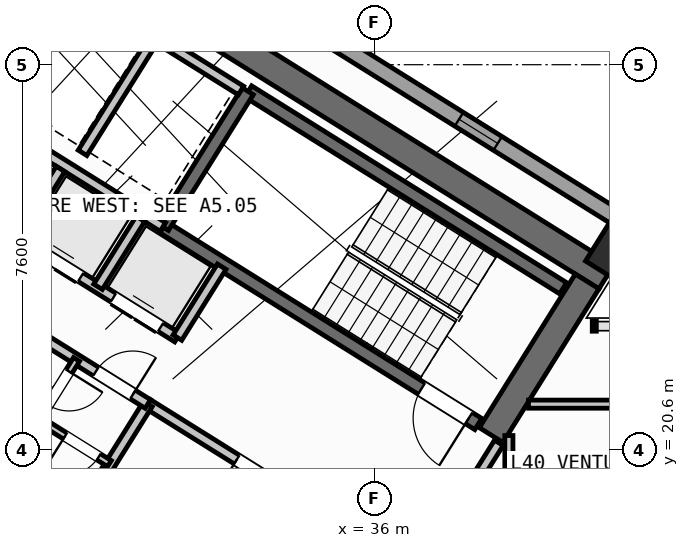
"""IFC4 building model, lengths in metres.
Left out: names, types, materials, properties, quantities, classifications, styles, units other than length and angle.
Written with IfcOpenShell. Run it as: python <this file> out.ifc"""

import sys

from ifc_helpers import new_model, si_unit, direction, frame, frame_2d, origin, origin_2d, place, context, subcontext, project, spatial, rectangle, hollow_rectangle, extrude, source, transform, mapped, element, fill, save


model = new_model("IFC4")
c1 = context("Model", 3, precision=1e-05, world=origin(), true_north=direction((0.0, 1.0)))
c2 = subcontext(c1, "Body", "Model", "MODEL_VIEW")
j1 = project(units=[si_unit("LENGTHUNIT", "METRE"), si_unit("PLANEANGLEUNIT", "RADIAN")], contexts=[c1])
p1 = place(None, origin())
s1 = spatial("IfcSite", under=j1, at=p1, CompositionType="ELEMENT")
p2 = place(p1, origin())
s2 = spatial("IfcBuilding", under=s1, at=p2, CompositionType="ELEMENT")
p3 = place(p2, frame((0.0, 0.0, 158.7)))
s3 = spatial("IfcBuildingStorey", under=s2, at=p3, CompositionType="ELEMENT", Elevation=158.7)
p4 = place(p3, frame((40.573, 24.01, 0.0), z_axis=(0.0, 0.0, 1.0), x_axis=(-0.848047359947, 0.529920442413, 0.0)))
e1 = element("IfcWall", 1, at=p4, inside=s3, PredefinedType="SHEAR", context=c2, shape_type="SweptSolid", body=[
    extrude(rectangle(XDim=13.14, YDim=0.55, at=frame_2d((6.57, 0.0))), origin(), (0.0, 0.0, 1.0), 3.35),
])
p5 = place(p3, frame((40.194, 23.922, 0.0), z_axis=(0.0, 0.0, 1.0), x_axis=(-0.529888438328, -0.848067357541, 0.0)))
e2 = element("IfcWall", 2, at=p5, inside=s3, PredefinedType="SHEAR", context=c2, shape_type="SweptSolid", body=[
    extrude(rectangle(XDim=3.575, YDim=0.55, at=frame_2d((1.788, 0.0))), origin(), (0.0, 0.0, 1.0), 3.35),
])
p6 = place(p3, frame((29.517, 30.594, 0.0), z_axis=(0.0, 0.0, 1.0), x_axis=(-0.529906864564, -0.848055844204, 0.0)))
e3 = element("IfcWall", 3, at=p6, inside=s3, PredefinedType="SHEAR", context=c2, shape_type="SweptSolid", body=[
    extrude(rectangle(XDim=3.575, YDim=0.55, at=frame_2d((1.788, 0.0))), origin(), (0.0, 0.0, 1.0), 3.35),
])
m1 = source(origin(), c2, "Body", "SweptSolid", [
    extrude(hollow_rectangle(XDim=0.9, YDim=0.9, WallThickness=0.036, at=origin_2d()), origin(), (0.0, 0.0, 1.0), 3.6),
])
p7 = place(p3, frame((40.783, 24.469, 0.0), z_axis=(0.0, 0.0, 1.0), x_axis=(-0.848048096156, 0.529919264233, 0.0)))
e4 = element("IfcColumn", 4, at=p7, inside=s3, PredefinedType="COLUMN", context=c2, shape_type="MappedRepresentation", body=[
    mapped(m1, transform((0.0, 0.0, 0.0), scale=1.0)),
])
p8 = place(p3, frame((14.138, 41.825, 0.0), z_axis=(0.0, 0.0, 1.0), x_axis=(0.848046498049, -0.529921821731, 0.0)))
e5 = element("IfcWall", 5, at=p8, inside=s3, PredefinedType="STANDARD", context=c2, shape_type="SweptSolid", body=[
    extrude(rectangle(XDim=31.588, YDim=0.32, at=frame_2d((15.794, 0.0))), origin(), (0.0, 0.0, 1.0), 3.35),
])
p9 = place(p8, frame((9.792, 0.0, 0.0)))
e6 = element("IfcOpeningElement", 6, at=p9, cuts=e5, PredefinedType="OPENING", context=c2, shape_type="SweptSolid", body=[
    extrude(rectangle(XDim=1.05, YDim=2.15, at=frame_2d((0.525, 1.075))), frame((0.0, 0.17, 0.0), z_axis=(0.0, -1.0, 0.0), x_axis=(1.0, 0.0, 0.0)), (0.0, 0.0, 1.0), 0.34),
])
p10 = place(p8, frame((0.791, 0.0, 0.85)))
e7 = element("IfcOpeningElement", 7, at=p10, cuts=e5, PredefinedType="OPENING", context=c2, shape_type="SweptSolid", body=[
    extrude(rectangle(XDim=1.8, YDim=1.5, at=frame_2d((0.9, 0.75))), frame((0.0, 0.17, 0.0), z_axis=(0.0, -1.0, 0.0), x_axis=(1.0, 0.0, 0.0)), (0.0, 0.0, 1.0), 0.34),
])
p11 = place(p8, frame((3.996, 0.0, 0.95)))
e8 = element("IfcOpeningElement", 8, at=p11, cuts=e5, PredefinedType="OPENING", context=c2, shape_type="SweptSolid", body=[
    extrude(rectangle(XDim=1.2, YDim=1.4, at=frame_2d((0.6, 0.7))), frame((0.0, 0.17, 0.0), z_axis=(0.0, -1.0, 0.0), x_axis=(1.0, 0.0, 0.0)), (0.0, 0.0, 1.0), 0.34),
])
p12 = place(p8, frame((13.874, 0.0, 0.85)))
e9 = element("IfcOpeningElement", 9, at=p12, cuts=e5, PredefinedType="OPENING", context=c2, shape_type="SweptSolid", body=[
    extrude(rectangle(XDim=1.5, YDim=1.5, at=frame_2d((0.75, 0.75))), frame((0.0, 0.17, 0.0), z_axis=(0.0, -1.0, 0.0), x_axis=(1.0, 0.0, 0.0)), (0.0, 0.0, 1.0), 0.34),
])
p13 = place(p8, frame((17.104, 0.0, 1.0)))
e10 = element("IfcOpeningElement", 10, at=p13, cuts=e5, PredefinedType="OPENING", context=c2, shape_type="SweptSolid", body=[
    extrude(rectangle(XDim=0.9, YDim=1.25, at=frame_2d((0.45, 0.625))), frame((0.0, 0.17, 0.0), z_axis=(0.0, -1.0, 0.0), x_axis=(1.0, 0.0, 0.0)), (0.0, 0.0, 1.0), 0.34),
])
p14 = place(p8, frame((22.144, 0.0, 1.0)))
e11 = element("IfcOpeningElement", 11, at=p14, cuts=e5, PredefinedType="OPENING", context=c2, shape_type="SweptSolid", body=[
    extrude(rectangle(XDim=0.9, YDim=1.25, at=frame_2d((0.45, 0.625))), frame((0.0, 0.17, 0.0), z_axis=(0.0, -1.0, 0.0), x_axis=(1.0, 0.0, 0.0)), (0.0, 0.0, 1.0), 0.34),
])
p15 = place(p8, frame((27.744, 0.0, 1.0)))
e12 = element("IfcOpeningElement", 12, at=p15, cuts=e5, PredefinedType="OPENING", context=c2, shape_type="SweptSolid", body=[
    extrude(rectangle(XDim=0.9, YDim=1.25, at=frame_2d((0.45, 0.625))), frame((0.0, 0.17, 0.0), z_axis=(0.0, -1.0, 0.0), x_axis=(1.0, 0.0, 0.0)), (0.0, 0.0, 1.0), 0.34),
])
p16 = place(p3, frame((31.28, 18.261, 0.0), z_axis=(0.0, 0.0, 1.0), x_axis=(-0.848051618787, 0.529913626805, 0.0)))
e13 = element("IfcWall", 13, at=p16, inside=s3, PredefinedType="SHEAR", context=c2, shape_type="SweptSolid", body=[
    extrude(rectangle(XDim=7.46, YDim=0.26, at=frame_2d((3.73, 0.0))), origin(), (0.0, 0.0, 1.0), 3.35),
])
p17 = place(p16, frame((0.36, 0.0, 0.0)))
e14 = element("IfcOpeningElement", 14, at=p17, cuts=e13, PredefinedType="OPENING", context=c2, shape_type="SweptSolid", body=[
    extrude(rectangle(XDim=0.86, YDim=2.05, at=frame_2d((0.43, 1.025))), frame((0.0, 0.14, 0.0), z_axis=(0.0, -1.0, 0.0), x_axis=(1.0, 0.0, 0.0)), (0.0, 0.0, 1.0), 0.28),
])
p18 = place(p3, frame((39.721, 23.788, 0.0), z_axis=(0.0, 0.0, 1.0), x_axis=(-0.848054434086, 0.529909121291, 0.0)))
e15 = element("IfcWall", 15, at=p18, inside=s3, PredefinedType="SHEAR", context=c2, shape_type="SweptSolid", body=[
    extrude(rectangle(XDim=7.33, YDim=0.26, at=frame_2d((3.665, 0.0))), origin(), (0.0, 0.0, 1.0), 3.35),
])
p19 = place(p3, frame((38.046, 21.108, 0.0), z_axis=(0.0, 0.0, 1.0), x_axis=(-0.848054434086, 0.529909121291, 0.0)))
e16 = element("IfcWall", 16, at=p19, inside=s3, PredefinedType="SHEAR", context=c2, shape_type="SweptSolid", body=[
    extrude(rectangle(XDim=7.33, YDim=0.26, at=frame_2d((3.665, 0.0))), origin(), (0.0, 0.0, 1.0), 3.35),
])
p20 = place(p19, frame((0.22, 0.0, 0.0)))
e17 = element("IfcOpeningElement", 17, at=p20, cuts=e16, PredefinedType="OPENING", context=c2, shape_type="SweptSolid", body=[
    extrude(rectangle(XDim=1.1, YDim=2.1, at=frame_2d((0.55, 1.05))), frame((0.0, 0.14, 0.0), z_axis=(0.0, -1.0, 0.0), x_axis=(1.0, 0.0, 0.0)), (0.0, 0.0, 1.0), 0.28),
])
p21 = place(p3, frame((33.496, 27.677, 0.0), z_axis=(0.0, 0.0, 1.0), x_axis=(-0.529908658664, -0.84805472316, 0.0)))
e18 = element("IfcWall", 18, at=p21, inside=s3, PredefinedType="SHEAR", context=c2, shape_type="SweptSolid", body=[
    extrude(rectangle(XDim=3.16, YDim=0.26, at=frame_2d((1.58, 0.0))), origin(), (0.0, 0.0, 1.0), 3.35),
])
p22 = place(p3, frame((36.417, 18.447, 0.0), z_axis=(0.0, 0.0, 1.0), x_axis=(-0.848064879198, 0.529892404805, 0.0)))
e19 = element("IfcWall", 19, at=p22, inside=s3, PredefinedType="STANDARD", context=c2, shape_type="SweptSolid", body=[
    extrude(rectangle(XDim=5.768, YDim=0.2, at=frame_2d((2.884, 0.0))), origin(), (0.0, 0.0, 1.0), 3.34),
])
p23 = place(p22, frame((2.548, 0.0, 0.0)))
e20 = element("IfcOpeningElement", 20, at=p23, cuts=e19, PredefinedType="OPENING", context=c2, shape_type="SweptSolid", body=[
    extrude(rectangle(XDim=1.15, YDim=2.1, at=frame_2d((0.575, 1.05))), frame((0.0, 0.11, 0.0), z_axis=(0.0, -1.0, 0.0), x_axis=(1.0, 0.0, 0.0)), (0.0, 0.0, 1.0), 0.22),
])
p24 = place(p3, frame((31.822, 24.998, 0.0), z_axis=(0.0, 0.0, 1.0), x_axis=(-0.848036912365, 0.52993716162, 0.0)))
e21 = element("IfcWall", 21, at=p24, inside=s3, PredefinedType="STANDARD", context=c2, shape_type="SweptSolid", body=[
    extrude(rectangle(XDim=4.618, YDim=0.2, at=frame_2d((2.309, 0.0))), origin(), (0.0, 0.0, 1.0), 3.34),
])
p25 = place(p3, frame((32.108, 22.814, 0.0), z_axis=(0.0, 0.0, 1.0), x_axis=(-0.848042229521, 0.529928652696, 0.0)))
e22 = element("IfcWall", 22, at=p25, inside=s3, PredefinedType="STANDARD", context=c2, shape_type="SweptSolid", body=[
    extrude(rectangle(XDim=5.62, YDim=0.2, at=frame_2d((2.81, 0.0))), origin(), (0.0, 0.0, 1.0), 3.34),
])
p26 = place(p25, frame((0.39, 0.0, 0.0)))
e23 = element("IfcOpeningElement", 23, at=p26, cuts=e22, PredefinedType="OPENING", context=c2, shape_type="SweptSolid", body=[
    extrude(rectangle(XDim=1.1, YDim=2.15, at=frame_2d((0.55, 1.075))), frame((0.0, 0.11, 0.0), z_axis=(0.0, -1.0, 0.0), x_axis=(1.0, 0.0, 0.0)), (0.0, 0.0, 1.0), 0.22),
])
p27 = place(p25, frame((2.25, 0.0, 0.0)))
e24 = element("IfcOpeningElement", 24, at=p27, cuts=e22, PredefinedType="OPENING", context=c2, shape_type="SweptSolid", body=[
    extrude(rectangle(XDim=1.1, YDim=2.15, at=frame_2d((0.55, 1.075))), frame((0.0, 0.11, 0.0), z_axis=(0.0, -1.0, 0.0), x_axis=(1.0, 0.0, 0.0)), (0.0, 0.0, 1.0), 0.22),
])
p28 = place(p25, frame((4.11, 0.0, 0.0)))
e25 = element("IfcOpeningElement", 25, at=p28, cuts=e22, PredefinedType="OPENING", context=c2, shape_type="SweptSolid", body=[
    extrude(rectangle(XDim=1.1, YDim=2.15, at=frame_2d((0.55, 1.075))), frame((0.0, 0.11, 0.0), z_axis=(0.0, -1.0, 0.0), x_axis=(1.0, 0.0, 0.0)), (0.0, 0.0, 1.0), 0.22),
])
p29 = place(p3, frame((32.982, 24.213, 0.0), z_axis=(0.0, 0.0, 1.0), x_axis=(-0.529839334948, -0.84809803628, 0.0)))
e26 = element("IfcWall", 26, at=p29, inside=s3, PredefinedType="STANDARD", context=c2, shape_type="SweptSolid", body=[
    extrude(rectangle(XDim=1.65, YDim=0.2, at=frame_2d((0.825, 0.0))), origin(), (0.0, 0.0, 1.0), 3.34),
])
p30 = place(p3, frame((31.645, 28.716, 0.0), z_axis=(0.0, 0.0, 1.0), x_axis=(-0.52986693015, -0.848080795876, 0.0)))
e27 = element("IfcWall", 27, at=p30, inside=s3, PredefinedType="STANDARD", context=c2, shape_type="SweptSolid", body=[
    extrude(rectangle(XDim=2.66, YDim=0.2, at=frame_2d((1.33, 0.0))), origin(), (0.0, 0.0, 1.0), 3.34),
])
p31 = place(p3, frame((33.363, 27.69, 0.0), z_axis=(0.0, 0.0, 1.0), x_axis=(-0.848047090064, 0.529920874315, 0.0)))
e28 = element("IfcWall", 28, at=p31, inside=s3, PredefinedType="STANDARD", context=c2, shape_type="SweptSolid", body=[
    extrude(rectangle(XDim=4.498, YDim=0.2, at=frame_2d((2.249, 0.0))), origin(), (0.0, 0.0, 1.0), 3.34),
])
for number, where, z_axis, x_axis in (
    (29, (31.379, 25.156, 0.0), (0.0, 0.0, 1.0), (-0.53, -0.848, 0.0)),
    (30, (29.801, 26.142, 0.0), (0.0, 0.0, 1.0), (-0.53, -0.848, 0.0)),
):
    element("IfcWall", number, at=place(p3, frame(where, z_axis=z_axis, x_axis=x_axis)), inside=s3, PredefinedType="STANDARD", context=c2, shape_type="SweptSolid", body=[
        extrude(rectangle(XDim=1.58, YDim=0.2, at=frame_2d((0.79, 0.0))), origin(), (0.0, 0.0, 1.0), 3.34),
    ])
p32 = place(p3, frame((31.525, 21.504, 0.0), z_axis=(0.0, 0.0, 1.0), x_axis=(-0.529907497854, -0.848055448493, 0.0)))
e31 = element("IfcWall", 31, at=p32, inside=s3, PredefinedType="STANDARD", context=c2, shape_type="SweptSolid", body=[
    extrude(rectangle(XDim=2.88, YDim=0.2, at=frame_2d((1.44, 0.0))), origin(), (0.0, 0.0, 1.0), 3.34),
])
p33 = place(p3, frame((31.525, 21.504, 0.0), z_axis=(0.0, 0.0, 1.0), x_axis=(-0.848040211232, 0.529931882541, 0.0)))
e32 = element("IfcWall", 32, at=p33, inside=s3, PredefinedType="STANDARD", context=c2, shape_type="SweptSolid", body=[
    extrude(rectangle(XDim=6.218, YDim=0.2, at=frame_2d((3.109, 0.0))), origin(), (0.0, 0.0, 1.0), 3.34),
])
p34 = place(p33, frame((4.4, 0.0, 0.0)))
e33 = element("IfcOpeningElement", 33, at=p34, cuts=e32, PredefinedType="OPENING", context=c2, shape_type="SweptSolid", body=[
    extrude(rectangle(XDim=0.86, YDim=2.05, at=frame_2d((0.43, 1.025))), frame((0.0, 0.11, 0.0), z_axis=(0.0, -1.0, 0.0), x_axis=(1.0, 0.0, 0.0)), (0.0, 0.0, 1.0), 0.22),
])
p35 = place(p33, frame((0.35, 0.0, 0.0)))
e34 = element("IfcOpeningElement", 34, at=p35, cuts=e32, PredefinedType="OPENING", context=c2, shape_type="SweptSolid", body=[
    extrude(rectangle(XDim=0.86, YDim=2.05, at=frame_2d((0.43, 1.025))), frame((0.0, 0.11, 0.0), z_axis=(0.0, -1.0, 0.0), x_axis=(1.0, 0.0, 0.0)), (0.0, 0.0, 1.0), 0.22),
])
p36 = place(p3, frame((30.117, 22.384, 0.0), z_axis=(0.0, 0.0, 1.0), x_axis=(-0.529951914384, -0.848027693204, 0.0)))
e35 = element("IfcWall", 35, at=p36, inside=s3, PredefinedType="PLUMBINGWALL", context=c2, shape_type="SweptSolid", body=[
    extrude(rectangle(XDim=1.4, YDim=0.14, at=frame_2d((0.7, 0.0))), origin(), (0.0, 0.0, 1.0), 3.34),
])
p37 = place(p36, frame((0.28, 0.0, 0.0)))
e36 = element("IfcOpeningElement", 36, at=p37, cuts=e35, PredefinedType="OPENING", context=c2, shape_type="SweptSolid", body=[
    extrude(rectangle(XDim=0.78, YDim=2.05, at=frame_2d((0.39, 1.025))), frame((0.0, 0.08, 0.0), z_axis=(0.0, -1.0, 0.0), x_axis=(1.0, 0.0, 0.0)), (0.0, 0.0, 1.0), 0.16),
])
p38 = place(p3, frame((30.766, 20.327, 0.0), z_axis=(0.0, 0.0, 1.0), x_axis=(-0.848052663127, 0.529911955482, 0.0)))
e37 = element("IfcWall", 37, at=p38, inside=s3, PredefinedType="PLUMBINGWALL", context=c2, shape_type="SweptSolid", body=[
    extrude(rectangle(XDim=3.28, YDim=0.14, at=frame_2d((1.64, 0.0))), origin(), (0.0, 0.0, 1.0), 3.34),
])
p39 = place(p38, frame((0.25, 0.0, 0.0)))
e38 = element("IfcOpeningElement", 38, at=p39, cuts=e37, PredefinedType="OPENING", context=c2, shape_type="SweptSolid", body=[
    extrude(rectangle(XDim=0.78, YDim=2.05, at=frame_2d((0.39, 1.025))), frame((0.0, 0.08, 0.0), z_axis=(0.0, -1.0, 0.0), x_axis=(1.0, 0.0, 0.0)), (0.0, 0.0, 1.0), 0.16),
])
p40 = place(p38, frame((1.92, 0.0, 0.0)))
e39 = element("IfcOpeningElement", 39, at=p40, cuts=e37, PredefinedType="OPENING", context=c2, shape_type="SweptSolid", body=[
    extrude(rectangle(XDim=0.78, YDim=2.05, at=frame_2d((0.39, 1.025))), frame((0.0, 0.08, 0.0), z_axis=(0.0, -1.0, 0.0), x_axis=(1.0, 0.0, 0.0)), (0.0, 0.0, 1.0), 0.16),
])
p41 = place(p3, frame((38.451, 20.737, 0.0), z_axis=(0.0, 0.0, 1.0), x_axis=(-0.529924799939, -0.848044637038, 0.0)))
e40 = element("IfcWall", 40, at=p41, inside=s3, PredefinedType="STANDARD", context=c2, shape_type="SweptSolid", body=[
    extrude(rectangle(XDim=2.96, YDim=0.2, at=frame_2d((1.48, 0.0))), origin(), (0.0, 0.0, 1.0), 3.34),
])
p42 = place(p41, frame((1.46, 0.0, 0.0)))
e41 = element("IfcOpeningElement", 41, at=p42, cuts=e40, PredefinedType="OPENING", context=c2, shape_type="SweptSolid", body=[
    extrude(rectangle(XDim=0.86, YDim=2.05, at=frame_2d((0.43, 1.025))), frame((0.0, 0.11, 0.0), z_axis=(0.0, -1.0, 0.0), x_axis=(1.0, 0.0, 0.0)), (0.0, 0.0, 1.0), 0.22),
])
p43 = place(p3, frame((38.65, 17.93, 0.0), z_axis=(0.0, 0.0, 1.0), x_axis=(0.0, 1.0, 0.0)))
e42 = element("IfcWall", 42, at=p43, inside=s3, PredefinedType="PARTITIONING", context=c2, shape_type="SweptSolid", body=[
    extrude(rectangle(XDim=2.951, YDim=0.16, at=frame_2d((1.476, 0.0))), origin(), (0.0, 0.0, 1.0), 3.34),
])
p44 = place(p3, frame((39.037, 21.5, 0.0), z_axis=(0.0, 0.0, 1.0), x_axis=(1.0, 0.0, 0.0)))
e43 = element("IfcWall", 43, at=p44, inside=s3, PredefinedType="PARTITIONING", context=c2, shape_type="SweptSolid", body=[
    extrude(rectangle(XDim=7.215, YDim=0.16, at=frame_2d((3.607, 0.0))), origin(), (0.0, 0.0, 1.0), 3.34),
])
m2 = source(origin(), c2, "Body", "SweptSolid", [
    extrude(rectangle(XDim=0.9, YDim=1.25, at=frame_2d((0.45, 0.625))), frame((0.0, 0.03, 0.0), z_axis=(0.0, -1.0, 0.0), x_axis=(1.0, 0.0, 0.0)), (0.0, 0.0, 1.0), 0.06),
])
p45 = place(p15, origin())
e44 = element("IfcWindow", 44, at=p45, inside=s3, PartitioningType="SINGLE_PANEL", PredefinedType="WINDOW", context=c2, shape_type="MappedRepresentation", body=[
    mapped(m2, transform((0.0, 0.0, 0.0), scale=1.0)),
])
fill(e12, e44)
m3 = source(origin(), c2, "Body", "SweptSolid", [
    extrude(rectangle(XDim=1.1, YDim=2.1, at=frame_2d((0.55, 1.05))), frame((0.0, 0.025, 0.0), z_axis=(0.0, -1.0, 0.0), x_axis=(1.0, 0.0, 0.0)), (0.0, 0.0, 1.0), 0.05),
])
p46 = place(p20, origin())
e45 = element("IfcDoor", 45, at=p46, inside=s3, OperationType="SINGLE_SWING_LEFT", PredefinedType="DOOR", context=c2, shape_type="MappedRepresentation", body=[
    mapped(m3, transform((0.0, 0.0, 0.0), scale=1.0)),
])
fill(e17, e45)
m4 = source(origin(), c2, "Body", "SweptSolid", [
    extrude(rectangle(XDim=1.15, YDim=2.1, at=frame_2d((0.575, 1.05))), frame((0.0, 0.025, 0.0), z_axis=(0.0, -1.0, 0.0), x_axis=(1.0, 0.0, 0.0)), (0.0, 0.0, 1.0), 0.05),
])
p47 = place(p23, origin())
e46 = element("IfcDoor", 46, at=p47, inside=s3, OperationType="SINGLE_SWING_RIGHT", PredefinedType="DOOR", context=c2, shape_type="MappedRepresentation", body=[
    mapped(m4, transform((0.0, 0.0, 0.0), scale=1.0)),
])
fill(e20, e46)
m5 = source(origin(), c2, "Body", "SweptSolid", [
    extrude(rectangle(XDim=1.1, YDim=2.15, at=frame_2d((0.55, 1.075))), frame((0.0, 0.025, 0.0), z_axis=(0.0, -1.0, 0.0), x_axis=(1.0, 0.0, 0.0)), (0.0, 0.0, 1.0), 0.05),
])
p48 = place(p26, origin())
e47 = element("IfcDoor", 47, at=p48, inside=s3, OperationType="DOUBLE_DOOR_SLIDING", PredefinedType="DOOR", context=c2, shape_type="MappedRepresentation", body=[
    mapped(m5, transform((0.0, 0.0, 0.0), scale=1.0)),
])
fill(e23, e47)
p49 = place(p27, origin())
e48 = element("IfcDoor", 48, at=p49, inside=s3, OperationType="DOUBLE_DOOR_SLIDING", PredefinedType="DOOR", context=c2, shape_type="MappedRepresentation", body=[
    mapped(m5, transform((0.0, 0.0, 0.0), scale=1.0)),
])
fill(e24, e48)
m6 = source(origin(), c2, "Body", "SweptSolid", [
    extrude(rectangle(XDim=0.86, YDim=2.05, at=frame_2d((0.43, 1.025))), frame((0.0, 0.025, 0.0), z_axis=(0.0, -1.0, 0.0), x_axis=(1.0, 0.0, 0.0)), (0.0, 0.0, 1.0), 0.05),
])
p50 = place(p35, frame((0.86, 0.0, 0.0), z_axis=(0.0, 0.0, 1.0), x_axis=(-1.0, 0.0, 0.0)))
e49 = element("IfcDoor", 49, at=p50, inside=s3, OperationType="SINGLE_SWING_RIGHT", PredefinedType="DOOR", context=c2, shape_type="MappedRepresentation", body=[
    mapped(m6, transform((0.0, 0.0, 0.0), scale=1.0)),
])
fill(e34, e49)
m7 = source(origin(), c2, "Body", "SweptSolid", [
    extrude(rectangle(XDim=0.78, YDim=2.05, at=frame_2d((0.39, 1.025))), frame((0.0, 0.025, 0.0), z_axis=(0.0, -1.0, 0.0), x_axis=(1.0, 0.0, 0.0)), (0.0, 0.0, 1.0), 0.05),
])
p51 = place(p37, origin())
e50 = element("IfcDoor", 50, at=p51, inside=s3, OperationType="SINGLE_SWING_LEFT", PredefinedType="DOOR", context=c2, shape_type="MappedRepresentation", body=[
    mapped(m7, transform((0.0, 0.0, 0.0), scale=1.0)),
])
fill(e36, e50)
p52 = place(p39, origin())
e51 = element("IfcDoor", 51, at=p52, inside=s3, OperationType="SINGLE_SWING_RIGHT", PredefinedType="DOOR", context=c2, shape_type="MappedRepresentation", body=[
    mapped(m7, transform((0.0, 0.0, 0.0), scale=1.0)),
])
fill(e38, e51)
save(model, sys.argv[1])
